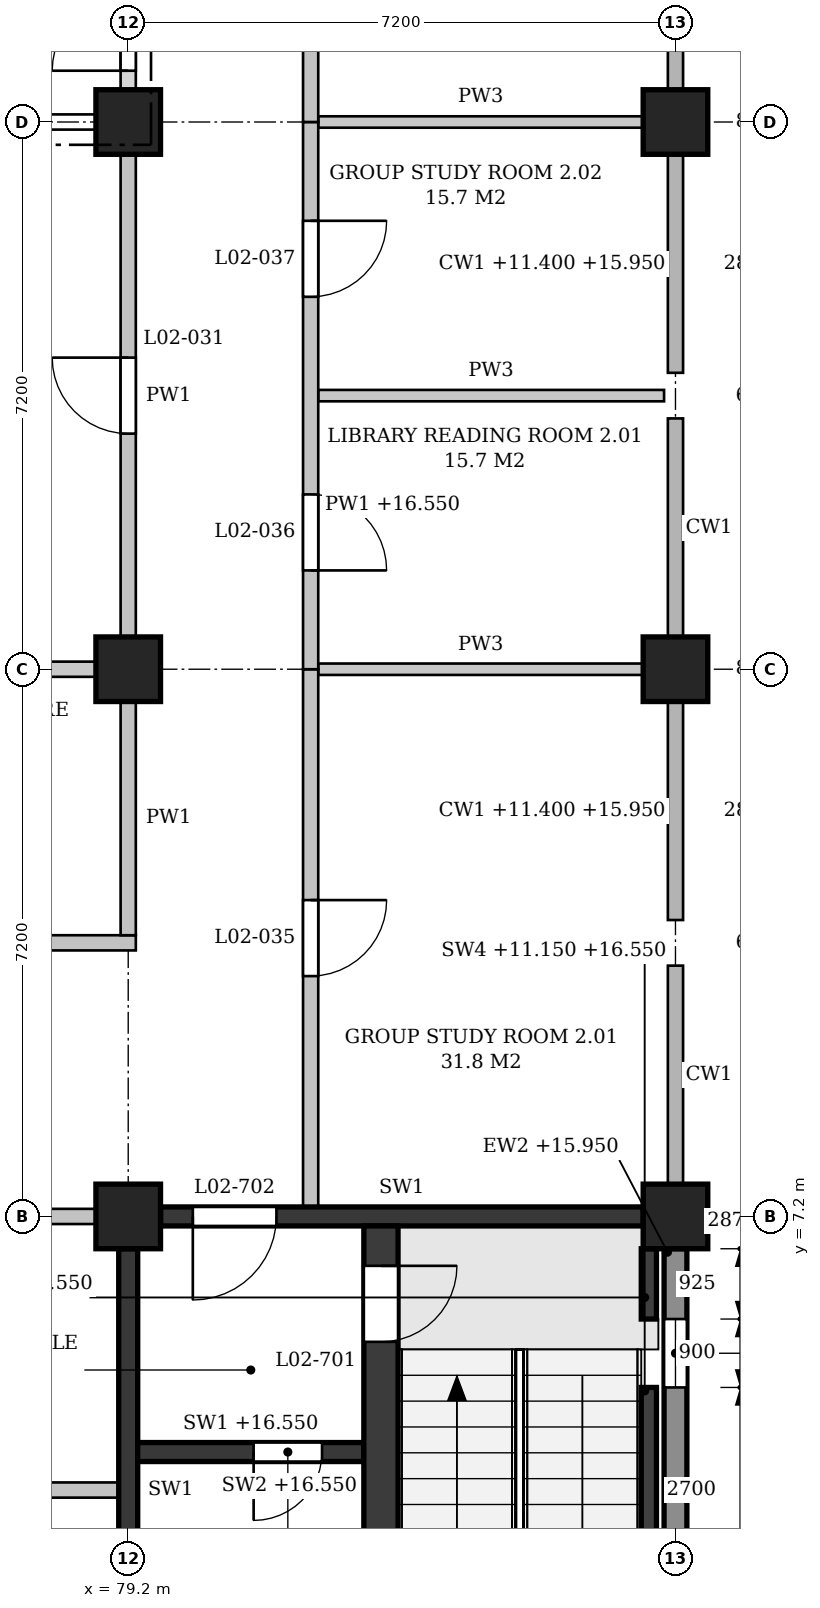
"""IFC4 building model, lengths in metres.
Left out: names, types, materials, properties, quantities, classifications, styles, units other than length and angle.
Written with IfcOpenShell. Run it as: python <this file> out.ifc"""

import sys

from ifc_helpers import new_model, si_unit, direction, frame, frame_2d, origin, origin_2d, place, context, subcontext, project, spatial, polyline, rectangle, outline, extrude, element, fill, save


model = new_model("IFC4")
c1 = context("Model", 3, precision=1e-05, world=origin(), true_north=direction((0.0, 1.0)))
c2 = subcontext(c1, "Body", "Model", "MODEL_VIEW")
j1 = project(units=[si_unit("LENGTHUNIT", "METRE"), si_unit("PLANEANGLEUNIT", "RADIAN")], contexts=[c1])
p1 = place(None, origin())
s1 = spatial("IfcSite", under=j1, at=p1, CompositionType="ELEMENT")
p2 = place(p1, origin())
s2 = spatial("IfcBuilding", under=s1, at=p2, CompositionType="ELEMENT")
p3 = place(p2, frame((0.0, 0.0, 11.4)))
s3 = spatial("IfcBuildingStorey", under=s2, at=p3, CompositionType="ELEMENT", Elevation=11.4)
for number, where, z_axis, x_axis in (
    (1, (79.2, 7.2, 0.0), (0.0, 0.0, 1.0), (1.0, 0.0, 0.0)),
    (2, (79.2, 14.4, 0.0), (0.0, 0.0, 1.0), (1.0, 0.0, 0.0)),
    (3, (79.2, 21.6, 0.0), (0.0, 0.0, 1.0), (1.0, 0.0, 0.0)),
    (4, (86.4, 7.2, 0.0), (0.0, 0.0, 1.0), (1.0, 0.0, 0.0)),
    (5, (86.4, 14.4, 0.0), (0.0, 0.0, 1.0), (1.0, 0.0, 0.0)),
    (6, (86.4, 21.6, 0.0), (0.0, 0.0, 1.0), (1.0, 0.0, 0.0)),
):
    element("IfcColumn", number, at=place(p3, frame(where, z_axis=z_axis, x_axis=x_axis)), inside=s3, PredefinedType="COLUMN", context=c2, shape_type="SweptSolid", body=[
        extrude(rectangle(XDim=0.85, YDim=0.85, at=origin_2d()), origin(), (0.0, 0.0, 1.0), 5.4),
    ])
p4 = place(p3, frame((86.4, 0.425, 0.0), z_axis=(0.0, 0.0, 1.0), x_axis=(0.0, 1.0, 0.0)))
e7 = element("IfcWall", 7, at=p4, inside=s3, PredefinedType="STANDARD", context=c2, shape_type="SweptSolid", body=[
    extrude(rectangle(XDim=6.35, YDim=0.3, at=frame_2d((3.175, 0.0))), origin(), (0.0, 0.0, 1.0), 4.55),
])
p5 = place(p4, frame((0.925, 0.0, 0.9)))
e8 = element("IfcOpeningElement", 8, at=p5, cuts=e7, PredefinedType="OPENING", context=c2, shape_type="SweptSolid", body=[
    extrude(outline(polyline([(0.0, 0.0), (0.9, 0.0), (0.9, 2.65), (0.45, 3.1), (0.0, 2.65), (0.0, 0.0)])), frame((0.0, 0.16, 0.0), z_axis=(0.0, -1.0, 0.0), x_axis=(1.0, 0.0, 0.0)), (0.0, 0.0, 1.0), 0.32),
])
p6 = place(p4, frame((4.525, 0.0, 0.9)))
e9 = element("IfcOpeningElement", 9, at=p6, cuts=e7, PredefinedType="OPENING", context=c2, shape_type="SweptSolid", body=[
    extrude(outline(polyline([(0.0, 0.0), (0.9, 0.0), (0.9, 2.65), (0.45, 3.1), (0.0, 2.65), (0.0, 0.0)])), frame((0.0, 0.16, 0.0), z_axis=(0.0, -1.0, 0.0), x_axis=(1.0, 0.0, 0.0)), (0.0, 0.0, 1.0), 0.32),
])
p7 = place(p3, frame((79.625, 7.2, 0.0), z_axis=(0.0, 0.0, 1.0), x_axis=(1.0, 0.0, 0.0)))
e10 = element("IfcWall", 10, at=p7, inside=s3, PredefinedType="SHEAR", context=c2, shape_type="SweptSolid", body=[
    extrude(rectangle(XDim=6.35, YDim=0.25, at=frame_2d((3.175, 0.0))), origin(), (0.0, 0.0, 1.0), 4.4),
])
p8 = place(p7, frame((0.425, 0.0, 0.0)))
e11 = element("IfcOpeningElement", 11, at=p8, cuts=e10, PredefinedType="OPENING", context=c2, shape_type="SweptSolid", body=[
    extrude(rectangle(XDim=1.1, YDim=2.1, at=frame_2d((0.55, 1.05))), frame((0.0, 0.135, 0.0), z_axis=(0.0, -1.0, 0.0), x_axis=(1.0, 0.0, 0.0)), (0.0, 0.0, 1.0), 0.27),
])
p9 = place(p3, frame((79.2, 0.425, 0.0), z_axis=(0.0, 0.0, 1.0), x_axis=(0.0, 1.0, 0.0)))
e12 = element("IfcWall", 12, at=p9, inside=s3, PredefinedType="SHEAR", context=c2, shape_type="SweptSolid", body=[
    extrude(rectangle(XDim=6.35, YDim=0.25, at=frame_2d((3.175, 0.0))), origin(), (0.0, 0.0, 1.0), 4.4),
])
p10 = place(p3, frame((86.05, 2.25, -0.25), z_axis=(0.0, 0.0, 1.0), x_axis=(0.0, 1.0, 0.0)))
e13 = element("IfcWall", 13, at=p10, inside=s3, PredefinedType="SHEAR", context=c2, shape_type="SweptSolid", body=[
    extrude(rectangle(XDim=2.7, YDim=0.2, at=frame_2d((1.35, 0.0))), origin(), (0.0, 0.0, 1.0), 5.4),
])
p11 = place(p3, frame((86.05, 5.85, -0.25), z_axis=(0.0, 0.0, 1.0), x_axis=(0.0, 1.0, 0.0)))
e14 = element("IfcWall", 14, at=p11, inside=s3, PredefinedType="SHEAR", context=c2, shape_type="SweptSolid", body=[
    extrude(rectangle(XDim=0.925, YDim=0.2, at=frame_2d((0.462, 0.0))), origin(), (0.0, 0.0, 1.0), 5.4),
])
p12 = place(p3, frame((82.525, 0.225, 0.0), z_axis=(0.0, 0.0, 1.0), x_axis=(0.0, 1.0, 0.0)))
e15 = element("IfcWall", 15, at=p12, inside=s3, PredefinedType="SHEAR", context=c2, shape_type="SweptSolid", body=[
    extrude(rectangle(XDim=6.85, YDim=0.45, at=frame_2d((3.425, 0.0))), origin(), (0.0, 0.0, 1.0), 5.15),
])
p13 = place(p12, frame((5.325, 0.0, 0.0)))
e16 = element("IfcOpeningElement", 16, at=p13, cuts=e15, PredefinedType="OPENING", context=c2, shape_type="SweptSolid", body=[
    extrude(rectangle(XDim=1.0, YDim=2.1, at=frame_2d((0.5, 1.05))), frame((0.0, 0.235, 0.0), z_axis=(0.0, -1.0, 0.0), x_axis=(1.0, 0.0, 0.0)), (0.0, 0.0, 1.0), 0.47),
])
p14 = place(p3, frame((79.325, 4.1, 0.0), z_axis=(0.0, 0.0, 1.0), x_axis=(1.0, 0.0, 0.0)))
e17 = element("IfcWall", 17, at=p14, inside=s3, PredefinedType="SHEAR", context=c2, shape_type="SweptSolid", body=[
    extrude(rectangle(XDim=2.975, YDim=0.25, at=frame_2d((1.488, 0.0))), origin(), (0.0, 0.0, 1.0), 5.15),
])
p15 = place(p14, frame((1.525, 0.0, 0.0)))
e18 = element("IfcOpeningElement", 18, at=p15, cuts=e17, PredefinedType="OPENING", context=c2, shape_type="SweptSolid", body=[
    extrude(rectangle(XDim=0.9, YDim=2.1, at=frame_2d((0.45, 1.05))), frame((0.0, 0.135, 0.0), z_axis=(0.0, -1.0, 0.0), x_axis=(1.0, 0.0, 0.0)), (0.0, 0.0, 1.0), 0.27),
])
p16 = place(p3, frame((72.15, 3.6, 0.0), z_axis=(0.0, 0.0, 1.0), x_axis=(1.0, 0.0, 0.0)))
e19 = element("IfcWall", 19, at=p16, inside=s3, PredefinedType="PARTITIONING", context=c2, shape_type="SweptSolid", body=[
    extrude(outline(polyline([(0.0, 0.0), (6.925, 0.0), (6.925, 4.4), (6.8, 4.4), (6.8, 5.15), (0.1, 5.15), (0.1, 4.55), (0.0, 4.55), (0.0, 0.0)])), frame((0.0, 0.1, 0.0), z_axis=(0.0, -1.0, 0.0), x_axis=(1.0, 0.0, 0.0)), (0.0, 0.0, 1.0), 0.2),
])
p17 = place(p16, frame((1.225, 0.0, 0.0)))
e20 = element("IfcOpeningElement", 20, at=p17, cuts=e19, PredefinedType="OPENING", context=c2, shape_type="SweptSolid", body=[
    extrude(rectangle(XDim=1.0, YDim=2.1, at=frame_2d((0.5, 1.05))), frame((0.0, 0.11, 0.0), z_axis=(0.0, -1.0, 0.0), x_axis=(1.0, 0.0, 0.0)), (0.0, 0.0, 1.0), 0.22),
])
p18 = place(p16, frame((4.688, 0.0, 0.0)))
e21 = element("IfcOpeningElement", 21, at=p18, cuts=e19, PredefinedType="OPENING", context=c2, shape_type="SweptSolid", body=[
    extrude(rectangle(XDim=1.0, YDim=2.1, at=frame_2d((0.5, 1.05))), frame((0.0, 0.11, 0.0), z_axis=(0.0, -1.0, 0.0), x_axis=(1.0, 0.0, 0.0)), (0.0, 0.0, 1.0), 0.22),
])
p19 = place(p3, frame((72.425, 7.2, 0.0), z_axis=(0.0, 0.0, 1.0), x_axis=(1.0, 0.0, 0.0)))
e22 = element("IfcWall", 22, at=p19, inside=s3, PredefinedType="PARTITIONING", context=c2, shape_type="SweptSolid", body=[
    extrude(rectangle(XDim=6.35, YDim=0.2, at=frame_2d((3.175, 0.0))), origin(), (0.0, 0.0, 1.0), 4.4),
])
p20 = place(p19, frame((2.675, 0.0, 0.0)))
e23 = element("IfcOpeningElement", 23, at=p20, cuts=e22, PredefinedType="OPENING", context=c2, shape_type="SweptSolid", body=[
    extrude(rectangle(XDim=1.0, YDim=2.1, at=frame_2d((0.5, 1.05))), frame((0.0, 0.11, 0.0), z_axis=(0.0, -1.0, 0.0), x_axis=(1.0, 0.0, 0.0)), (0.0, 0.0, 1.0), 0.22),
])
p21 = place(p3, frame((72.15, 10.8, 0.0), z_axis=(0.0, 0.0, 1.0), x_axis=(1.0, 0.0, 0.0)))
e24 = element("IfcWall", 24, at=p21, inside=s3, PredefinedType="PARTITIONING", context=c2, shape_type="SweptSolid", body=[
    extrude(outline(polyline([(0.0, 0.0), (7.15, 0.0), (7.15, 4.4), (6.8, 4.4), (6.8, 5.15), (0.1, 5.15), (0.1, 4.55), (0.0, 4.55), (0.0, 0.0)])), frame((0.0, 0.1, 0.0), z_axis=(0.0, -1.0, 0.0), x_axis=(1.0, 0.0, 0.0)), (0.0, 0.0, 1.0), 0.2),
])
p22 = place(p21, frame((1.225, 0.0, 0.0)))
e25 = element("IfcOpeningElement", 25, at=p22, cuts=e24, PredefinedType="OPENING", context=c2, shape_type="SweptSolid", body=[
    extrude(rectangle(XDim=1.0, YDim=2.1, at=frame_2d((0.5, 1.05))), frame((0.0, 0.11, 0.0), z_axis=(0.0, -1.0, 0.0), x_axis=(1.0, 0.0, 0.0)), (0.0, 0.0, 1.0), 0.22),
])
p23 = place(p21, frame((4.75, 0.0, 0.0)))
e26 = element("IfcOpeningElement", 26, at=p23, cuts=e24, PredefinedType="OPENING", context=c2, shape_type="SweptSolid", body=[
    extrude(rectangle(XDim=1.0, YDim=2.1, at=frame_2d((0.5, 1.05))), frame((0.0, 0.11, 0.0), z_axis=(0.0, -1.0, 0.0), x_axis=(1.0, 0.0, 0.0)), (0.0, 0.0, 1.0), 0.22),
])
p24 = place(p3, frame((75.6, 14.4, 0.0), z_axis=(0.0, 0.0, 1.0), x_axis=(1.0, 0.0, 0.0)))
e27 = element("IfcWall", 27, at=p24, inside=s3, PredefinedType="PARTITIONING", context=c2, shape_type="SweptSolid", body=[
    extrude(rectangle(XDim=3.175, YDim=0.2, at=frame_2d((1.587, 0.0))), origin(), (0.0, 0.0, 1.0), 4.4),
])
p25 = place(p3, frame((81.7, 14.4, 0.0), z_axis=(0.0, 0.0, 1.0), x_axis=(1.0, 0.0, 0.0)))
e28 = element("IfcWall", 28, at=p25, inside=s3, PredefinedType="PARTITIONING", context=c2, shape_type="SweptSolid", body=[
    extrude(rectangle(XDim=4.275, YDim=0.15, at=frame_2d((2.138, 0.0))), origin(), (0.0, 0.0, 1.0), 4.4),
])
p26 = place(p3, frame((81.7, 18.0, 0.0), z_axis=(0.0, 0.0, 1.0), x_axis=(1.0, 0.0, 0.0)))
e29 = element("IfcWall", 29, at=p26, inside=s3, PredefinedType="PARTITIONING", context=c2, shape_type="SweptSolid", body=[
    extrude(rectangle(XDim=4.55, YDim=0.15, at=frame_2d((2.275, 0.0))), origin(), (0.0, 0.0, 1.0), 4.4),
])
p27 = place(p3, frame((72.425, 21.6, 0.0), z_axis=(0.0, 0.0, 1.0), x_axis=(1.0, 0.0, 0.0)))
e30 = element("IfcWall", 30, at=p27, inside=s3, PredefinedType="PARTITIONING", context=c2, shape_type="SweptSolid", body=[
    extrude(rectangle(XDim=6.35, YDim=0.2, at=frame_2d((3.175, 0.0))), origin(), (0.0, 0.0, 1.0), 4.4),
])
p28 = place(p3, frame((81.7, 21.6, 0.0), z_axis=(0.0, 0.0, 1.0), x_axis=(1.0, 0.0, 0.0)))
e31 = element("IfcWall", 31, at=p28, inside=s3, PredefinedType="PARTITIONING", context=c2, shape_type="SweptSolid", body=[
    extrude(rectangle(XDim=4.275, YDim=0.15, at=frame_2d((2.138, 0.0))), origin(), (0.0, 0.0, 1.0), 4.4),
])
p29 = place(p3, frame((79.2, 10.9, 0.0), z_axis=(0.0, 0.0, 1.0), x_axis=(0.0, 1.0, 0.0)))
e32 = element("IfcWall", 32, at=p29, inside=s3, PredefinedType="PARTITIONING", context=c2, shape_type="SweptSolid", body=[
    extrude(rectangle(XDim=3.075, YDim=0.2, at=frame_2d((1.538, 0.0))), origin(), (0.0, 0.0, 1.0), 4.4),
])
p30 = place(p3, frame((79.2, 14.825, 0.0), z_axis=(0.0, 0.0, 1.0), x_axis=(0.0, 1.0, 0.0)))
e33 = element("IfcWall", 33, at=p30, inside=s3, PredefinedType="PARTITIONING", context=c2, shape_type="SweptSolid", body=[
    extrude(rectangle(XDim=6.35, YDim=0.2, at=frame_2d((3.175, 0.0))), origin(), (0.0, 0.0, 1.0), 4.4),
])
p31 = place(p30, frame((2.675, 0.0, 0.0)))
e34 = element("IfcOpeningElement", 34, at=p31, cuts=e33, PredefinedType="OPENING", context=c2, shape_type="SweptSolid", body=[
    extrude(rectangle(XDim=1.0, YDim=2.1, at=frame_2d((0.5, 1.05))), frame((0.0, 0.11, 0.0), z_axis=(0.0, -1.0, 0.0), x_axis=(1.0, 0.0, 0.0)), (0.0, 0.0, 1.0), 0.22),
])
p32 = place(p3, frame((79.2, 22.025, 0.0), z_axis=(0.0, 0.0, 1.0), x_axis=(0.0, 1.0, 0.0)))
e35 = element("IfcWall", 35, at=p32, inside=s3, PredefinedType="PARTITIONING", context=c2, shape_type="SweptSolid", body=[
    extrude(rectangle(XDim=2.5, YDim=0.2, at=frame_2d((1.25, 0.0))), origin(), (0.0, 0.0, 1.0), 4.4),
])
p33 = place(p32, frame((0.25, 0.0, 0.0)))
e36 = element("IfcOpeningElement", 36, at=p33, cuts=e35, PredefinedType="OPENING", context=c2, shape_type="SweptSolid", body=[
    extrude(rectangle(XDim=2.0, YDim=2.4, at=frame_2d((1.0, 1.2))), frame((0.0, 0.11, 0.0), z_axis=(0.0, -1.0, 0.0), x_axis=(1.0, 0.0, 0.0)), (0.0, 0.0, 1.0), 0.22),
])
p34 = place(p3, frame((81.6, 7.325, 0.0), z_axis=(0.0, 0.0, 1.0), x_axis=(0.0, 1.0, 0.0)))
e37 = element("IfcWall", 37, at=p34, inside=s3, PredefinedType="PARTITIONING", context=c2, shape_type="SweptSolid", body=[
    extrude(outline(polyline([(0.0, 0.0), (7.075, 0.0), (7.075, 4.4), (6.825, 4.4), (6.825, 5.15), (0.125, 5.15), (0.125, 4.4), (0.0, 4.4), (0.0, 0.0)])), frame((0.0, 0.1, 0.0), z_axis=(0.0, -1.0, 0.0), x_axis=(1.0, 0.0, 0.0)), (0.0, 0.0, 1.0), 0.2),
])
p35 = place(p34, frame((3.037, 0.0, 0.0)))
e38 = element("IfcOpeningElement", 38, at=p35, cuts=e37, PredefinedType="OPENING", context=c2, shape_type="SweptSolid", body=[
    extrude(rectangle(XDim=1.0, YDim=2.1, at=frame_2d((0.5, 1.05))), frame((0.0, 0.11, 0.0), z_axis=(0.0, -1.0, 0.0), x_axis=(1.0, 0.0, 0.0)), (0.0, 0.0, 1.0), 0.22),
])
p36 = place(p3, frame((81.6, 14.4, 0.0), z_axis=(0.0, 0.0, 1.0), x_axis=(0.0, 1.0, 0.0)))
e39 = element("IfcWall", 39, at=p36, inside=s3, PredefinedType="PARTITIONING", context=c2, shape_type="SweptSolid", body=[
    extrude(outline(polyline([(0.0, 0.0), (7.2, 0.0), (7.2, 4.4), (6.95, 4.4), (6.95, 5.15), (0.25, 5.15), (0.25, 4.4), (0.0, 4.4), (0.0, 0.0)])), frame((0.0, 0.1, 0.0), z_axis=(0.0, -1.0, 0.0), x_axis=(1.0, 0.0, 0.0)), (0.0, 0.0, 1.0), 0.2),
])
p37 = place(p36, frame((1.3, 0.0, 0.0)))
e40 = element("IfcOpeningElement", 40, at=p37, cuts=e39, PredefinedType="OPENING", context=c2, shape_type="SweptSolid", body=[
    extrude(rectangle(XDim=1.0, YDim=2.1, at=frame_2d((0.5, 1.05))), frame((0.0, 0.11, 0.0), z_axis=(0.0, -1.0, 0.0), x_axis=(1.0, 0.0, 0.0)), (0.0, 0.0, 1.0), 0.22),
])
p38 = place(p36, frame((4.9, 0.0, 0.0)))
e41 = element("IfcOpeningElement", 41, at=p38, cuts=e39, PredefinedType="OPENING", context=c2, shape_type="SweptSolid", body=[
    extrude(rectangle(XDim=1.0, YDim=2.1, at=frame_2d((0.5, 1.05))), frame((0.0, 0.11, 0.0), z_axis=(0.0, -1.0, 0.0), x_axis=(1.0, 0.0, 0.0)), (0.0, 0.0, 1.0), 0.22),
])
p39 = place(p3, frame((81.6, 21.6, 0.0), z_axis=(0.0, 0.0, 1.0), x_axis=(0.0, 1.0, 0.0)))
e42 = element("IfcWall", 42, at=p39, inside=s3, PredefinedType="PARTITIONING", context=c2, shape_type="SweptSolid", body=[
    extrude(outline(polyline([(0.0, 0.0), (7.2, 0.0), (7.2, 4.4), (6.95, 4.4), (6.95, 5.15), (0.25, 5.15), (0.25, 4.4), (0.0, 4.4), (0.0, 0.0)])), frame((0.0, 0.1, 0.0), z_axis=(0.0, -1.0, 0.0), x_axis=(1.0, 0.0, 0.0)), (0.0, 0.0, 1.0), 0.2),
])
p40 = place(p39, frame((3.1, 0.0, 0.0)))
e43 = element("IfcOpeningElement", 43, at=p40, cuts=e42, PredefinedType="OPENING", context=c2, shape_type="SweptSolid", body=[
    extrude(rectangle(XDim=1.0, YDim=2.1, at=frame_2d((0.5, 1.05))), frame((0.0, 0.11, 0.0), z_axis=(0.0, -1.0, 0.0), x_axis=(1.0, 0.0, 0.0)), (0.0, 0.0, 1.0), 0.22),
])
p41 = place(p6, origin())
e44 = element("IfcWindow", 44, at=p41, inside=s3, PartitioningType="SINGLE_PANEL", PredefinedType="WINDOW", context=c2, shape_type="SweptSolid", body=[
    extrude(outline(polyline([(0.0, 0.0), (0.9, 0.0), (0.9, 2.65), (0.45, 3.1), (0.0, 2.65), (0.0, 0.0)])), frame((0.0, 0.03, 0.0), z_axis=(0.0, -1.0, 0.0), x_axis=(1.0, 0.0, 0.0)), (0.0, 0.0, 1.0), 0.06),
])
fill(e9, e44)
p42 = place(p13, frame((1.0, 0.0, 0.0), z_axis=(0.0, 0.0, 1.0), x_axis=(-1.0, 0.0, 0.0)))
e45 = element("IfcDoor", 45, at=p42, inside=s3, OperationType="SINGLE_SWING_LEFT", PredefinedType="DOOR", context=c2, shape_type="SweptSolid", body=[
    extrude(rectangle(XDim=1.0, YDim=2.1, at=frame_2d((0.5, 1.05))), frame((0.0, 0.025, 0.0), z_axis=(0.0, -1.0, 0.0), x_axis=(1.0, 0.0, 0.0)), (0.0, 0.0, 1.0), 0.05),
])
fill(e16, e45)
p43 = place(p8, frame((1.1, 0.0, 0.0), z_axis=(0.0, 0.0, 1.0), x_axis=(-1.0, 0.0, 0.0)))
e46 = element("IfcDoor", 46, at=p43, inside=s3, OperationType="SINGLE_SWING_RIGHT", PredefinedType="DOOR", context=c2, shape_type="SweptSolid", body=[
    extrude(rectangle(XDim=1.1, YDim=2.1, at=frame_2d((0.55, 1.05))), frame((0.0, 0.025, 0.0), z_axis=(0.0, -1.0, 0.0), x_axis=(1.0, 0.0, 0.0)), (0.0, 0.0, 1.0), 0.05),
])
fill(e11, e46)
p44 = place(p15, frame((0.9, 0.0, 0.0), z_axis=(0.0, 0.0, 1.0), x_axis=(-1.0, 0.0, 0.0)))
e47 = element("IfcDoor", 47, at=p44, inside=s3, OperationType="SINGLE_SWING_RIGHT", PredefinedType="DOOR", context=c2, shape_type="SweptSolid", body=[
    extrude(rectangle(XDim=0.9, YDim=2.1, at=frame_2d((0.45, 1.05))), frame((0.0, 0.025, 0.0), z_axis=(0.0, -1.0, 0.0), x_axis=(1.0, 0.0, 0.0)), (0.0, 0.0, 1.0), 0.05),
])
fill(e18, e47)
p45 = place(p33, origin())
e48 = element("IfcDoor", 48, at=p45, inside=s3, OperationType="DOUBLE_DOOR_SINGLE_SWING", PredefinedType="DOOR", context=c2, shape_type="SweptSolid", body=[
    extrude(rectangle(XDim=2.0, YDim=2.4, at=frame_2d((1.0, 1.2))), frame((0.0, 0.025, 0.0), z_axis=(0.0, -1.0, 0.0), x_axis=(1.0, 0.0, 0.0)), (0.0, 0.0, 1.0), 0.05),
])
fill(e36, e48)
p46 = place(p31, origin())
e49 = element("IfcDoor", 49, at=p46, inside=s3, OperationType="SINGLE_SWING_RIGHT", PredefinedType="DOOR", context=c2, shape_type="SweptSolid", body=[
    extrude(rectangle(XDim=1.0, YDim=2.1, at=frame_2d((0.5, 1.05))), frame((0.0, 0.025, 0.0), z_axis=(0.0, -1.0, 0.0), x_axis=(1.0, 0.0, 0.0)), (0.0, 0.0, 1.0), 0.05),
])
fill(e34, e49)
p47 = place(p35, frame((1.0, 0.0, 0.0), z_axis=(0.0, 0.0, 1.0), x_axis=(-1.0, 0.0, 0.0)))
e50 = element("IfcDoor", 50, at=p47, inside=s3, OperationType="SINGLE_SWING_LEFT", PredefinedType="DOOR", context=c2, shape_type="SweptSolid", body=[
    extrude(rectangle(XDim=1.0, YDim=2.1, at=frame_2d((0.5, 1.05))), frame((0.0, 0.025, 0.0), z_axis=(0.0, -1.0, 0.0), x_axis=(1.0, 0.0, 0.0)), (0.0, 0.0, 1.0), 0.05),
])
fill(e38, e50)
p48 = place(p37, frame((1.0, 0.0, 0.0), z_axis=(0.0, 0.0, 1.0), x_axis=(-1.0, 0.0, 0.0)))
e51 = element("IfcDoor", 51, at=p48, inside=s3, OperationType="SINGLE_SWING_RIGHT", PredefinedType="DOOR", context=c2, shape_type="SweptSolid", body=[
    extrude(rectangle(XDim=1.0, YDim=2.1, at=frame_2d((0.5, 1.05))), frame((0.0, 0.025, 0.0), z_axis=(0.0, -1.0, 0.0), x_axis=(1.0, 0.0, 0.0)), (0.0, 0.0, 1.0), 0.05),
])
fill(e40, e51)
p49 = place(p38, frame((1.0, 0.0, 0.0), z_axis=(0.0, 0.0, 1.0), x_axis=(-1.0, 0.0, 0.0)))
e52 = element("IfcDoor", 52, at=p49, inside=s3, OperationType="SINGLE_SWING_LEFT", PredefinedType="DOOR", context=c2, shape_type="SweptSolid", body=[
    extrude(rectangle(XDim=1.0, YDim=2.1, at=frame_2d((0.5, 1.05))), frame((0.0, 0.025, 0.0), z_axis=(0.0, -1.0, 0.0), x_axis=(1.0, 0.0, 0.0)), (0.0, 0.0, 1.0), 0.05),
])
fill(e41, e52)
save(model, sys.argv[1])
